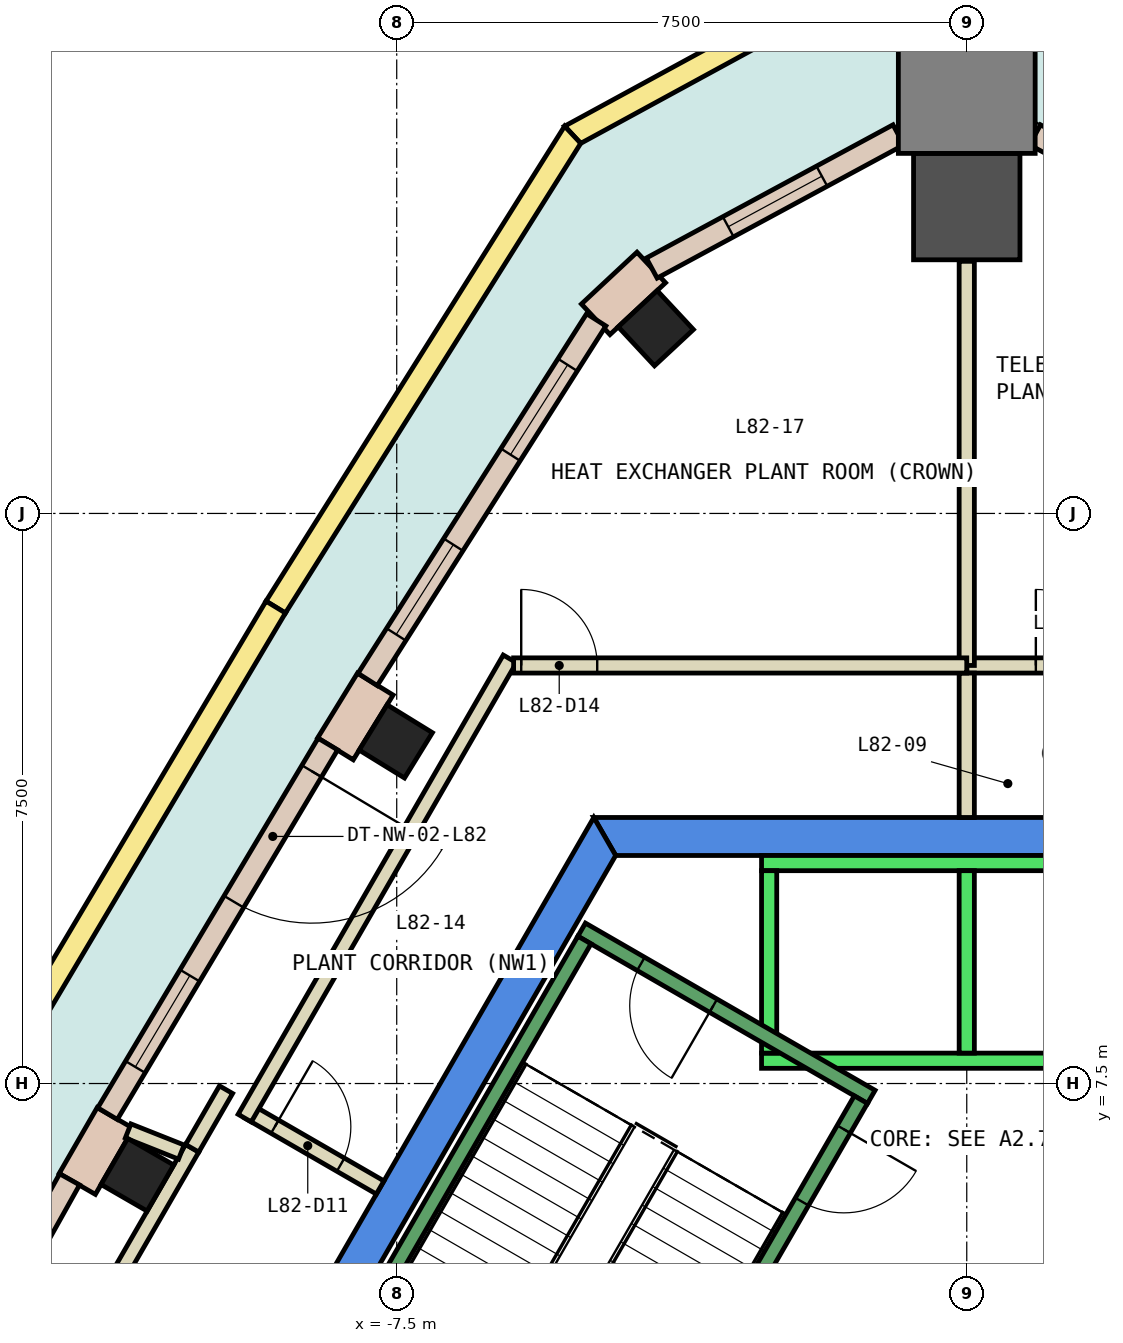
"""IFC4 building model, lengths in metres.
Left out: names, types, materials, properties, quantities, classifications, styles, units other than length and angle.
Written with IfcOpenShell. Run it as: python <this file> out.ifc"""

import sys

from ifc_helpers import new_model, si_unit, direction, frame, frame_2d, origin, origin_2d, place, context, subcontext, project, spatial, polyline, rectangle, outline, extrude, element, fill, save


model = new_model("IFC4")
c1 = context("Model", 3, precision=1e-05, world=origin(), true_north=direction((0.0, 1.0)))
c2 = subcontext(c1, "Body", "Model", "MODEL_VIEW")
j1 = project(units=[si_unit("LENGTHUNIT", "METRE"), si_unit("PLANEANGLEUNIT", "RADIAN")], contexts=[c1])
p1 = place(None, origin())
s1 = spatial("IfcSite", under=j1, at=p1, CompositionType="ELEMENT")
p2 = place(p1, origin())
s2 = spatial("IfcBuilding", under=s1, at=p2, CompositionType="ELEMENT")
p3 = place(p2, frame((0.0, 0.0, 349.4)))
s3 = spatial("IfcBuildingStorey", under=s2, at=p3, CompositionType="ELEMENT", Elevation=349.4)
p4 = place(p3, frame((0.0, 19.037, 0.0), z_axis=(0.0, 0.0, 1.0), x_axis=(0.0, 1.0, 0.0)))
e1 = element("IfcColumn", 1, at=p4, inside=s3, PredefinedType="COLUMN", context=c2, shape_type="SweptSolid", body=[
    extrude(rectangle(XDim=1.4, YDim=1.4, at=origin_2d()), origin(), (0.0, 0.0, 1.0), 4.15),
])
for number, where, z_axis, x_axis in (
    (2, (-4.091, 17.437, 0.0), (0.0, 0.0, 1.0), (0.732, 0.682, 0.0)),
    (3, (-7.512, 12.001, 0.0), (0.0, 0.0, 1.0), (0.524, 0.851, 0.0)),
    (4, (-10.912, 6.3, 0.0), (0.0, 0.0, 1.0), (0.5, 0.866, 0.0)),
):
    element("IfcColumn", number, at=place(p3, frame(where, z_axis=z_axis, x_axis=x_axis)), inside=s3, PredefinedType="COLUMN", context=c2, shape_type="SweptSolid", body=[
        extrude(rectangle(XDim=0.7, YDim=0.7, at=origin_2d()), origin(), (0.0, 0.0, 1.0), 4.15),
    ])
p5 = place(p3, frame((0.0, 20.637, 0.0), z_axis=(0.0, 0.0, 1.0), x_axis=(0.0, 1.0, 0.0)))
e5 = element("IfcColumn", 5, at=p5, inside=s3, PredefinedType="COLUMN", context=c2, shape_type="SweptSolid", body=[
    extrude(rectangle(XDim=1.8, YDim=1.8, at=origin_2d()), origin(), (0.0, 0.0, 1.0), 4.15),
])
p6 = place(p3, frame((0.0, 0.0, -0.45)))
e6 = element("IfcWall", 6, at=p6, inside=s3, PredefinedType="SHEAR", context=c2, shape_type="SweptSolid", body=[
    extrude(outline(polyline([(4.907, 11.0), (-4.907, 11.0), (-4.619, 10.5), (4.619, 10.5), (4.907, 11.0)])), origin(), (0.0, 0.0, 1.0), 4.6),
])
p7 = place(p3, frame((0.0, 0.0, -0.45)))
e7 = element("IfcWall", 7, at=p7, inside=s3, PredefinedType="SHEAR", context=c2, shape_type="SweptSolid", body=[
    extrude(outline(polyline([(-9.236, 3.502), (-8.803, 3.253), (-4.619, 10.5), (-4.907, 11.0), (-9.236, 3.502)])), origin(), (0.0, 0.0, 1.0), 4.6),
])
for number, where, z_axis, x_axis in (
    (8, (-4.151, 18.236, 0.0), (0.0, 0.0, 1.0), (-0.731, -0.682, 0.0)),
    (9, (-7.782, 12.755, 0.0), (0.0, 0.0, 1.0), (-0.524, -0.852, 0.0)),
):
    element("IfcWall", number, at=place(p3, frame(where, z_axis=z_axis, x_axis=x_axis)), inside=s3, PredefinedType="STANDARD", context=c2, shape_type="SweptSolid", body=[
        extrude(rectangle(XDim=1.0, YDim=0.55, at=frame_2d((0.5, 0.0))), origin(), (0.0, 0.0, 1.0), 4.15),
    ])
p8 = place(p3, frame((-11.203, 7.046, 0.0), z_axis=(0.0, 0.0, 1.0), x_axis=(-0.49960277677, -0.866254619292, 0.0)))
e10 = element("IfcWall", 10, at=p8, inside=s3, PredefinedType="STANDARD", context=c2, shape_type="SweptSolid", body=[
    extrude(rectangle(XDim=1.001, YDim=0.55, at=frame_2d((0.5, 0.0))), origin(), (0.0, 0.0, 1.0), 4.15),
])
p9 = place(p3, frame((4.145, 18.228, 0.0), z_axis=(0.0, 0.0, 1.0), x_axis=(-0.879900970731, 0.475157112654, 0.0)))
e11 = element("IfcWall", 11, at=p9, inside=s3, PredefinedType="STANDARD", context=c2, shape_type="SweptSolid", body=[
    extrude(rectangle(XDim=3.689, YDim=0.3, at=frame_2d((1.845, 0.0))), origin(), (0.0, 0.0, 1.0), 4.15),
])
p10 = place(p9, frame((1.145, 0.0, 0.9)))
e12 = element("IfcOpeningElement", 12, at=p10, cuts=e11, PredefinedType="OPENING", context=c2, shape_type="SweptSolid", body=[
    extrude(rectangle(XDim=1.4, YDim=3.0, at=frame_2d((0.7, 1.5))), frame((0.0, 0.16, 0.0), z_axis=(0.0, -1.0, 0.0), x_axis=(1.0, 0.0, 0.0)), (0.0, 0.0, 1.0), 0.32),
])
p11 = place(p3, frame((-0.899, 19.981, 0.0), z_axis=(0.0, 0.0, 1.0), x_axis=(-0.879900970731, -0.475157112654, 0.0)))
e13 = element("IfcWall", 13, at=p11, inside=s3, PredefinedType="STANDARD", context=c2, shape_type="SweptSolid", body=[
    extrude(rectangle(XDim=3.689, YDim=0.3, at=frame_2d((1.845, 0.0))), origin(), (0.0, 0.0, 1.0), 4.15),
])
p12 = place(p11, frame((1.145, 0.0, 0.9)))
e14 = element("IfcOpeningElement", 14, at=p12, cuts=e13, PredefinedType="OPENING", context=c2, shape_type="SweptSolid", body=[
    extrude(rectangle(XDim=1.4, YDim=3.0, at=frame_2d((0.7, 1.5))), frame((0.0, 0.16, 0.0), z_axis=(0.0, -1.0, 0.0), x_axis=(1.0, 0.0, 0.0)), (0.0, 0.0, 1.0), 0.32),
])
p13 = place(p3, frame((-4.875, 17.547, 0.0), z_axis=(0.0, 0.0, 1.0), x_axis=(-0.536531689467, -0.84388017289, 0.0)))
e15 = element("IfcWall", 15, at=p13, inside=s3, PredefinedType="STANDARD", context=c2, shape_type="SweptSolid", body=[
    extrude(rectangle(XDim=5.606, YDim=0.3, at=frame_2d((2.803, 0.0))), origin(), (0.0, 0.0, 1.0), 4.15),
])
p14 = place(p13, frame((0.702, 0.0, 0.9)))
e16 = element("IfcOpeningElement", 16, at=p14, cuts=e15, PredefinedType="OPENING", context=c2, shape_type="SweptSolid", body=[
    extrude(rectangle(XDim=1.4, YDim=3.0, at=frame_2d((0.7, 1.5))), frame((0.0, 0.16, 0.0), z_axis=(0.0, -1.0, 0.0), x_axis=(1.0, 0.0, 0.0)), (0.0, 0.0, 1.0), 0.32),
])
p15 = place(p13, frame((3.505, 0.0, 0.9)))
e17 = element("IfcOpeningElement", 17, at=p15, cuts=e15, PredefinedType="OPENING", context=c2, shape_type="SweptSolid", body=[
    extrude(rectangle(XDim=1.4, YDim=3.0, at=frame_2d((0.7, 1.5))), frame((0.0, 0.16, 0.0), z_axis=(0.0, -1.0, 0.0), x_axis=(1.0, 0.0, 0.0)), (0.0, 0.0, 1.0), 0.32),
])
p16 = place(p3, frame((-8.406, 11.966, 0.0), z_axis=(0.0, 0.0, 1.0), x_axis=(-0.512115331419, -0.858916694055, 0.0)))
e18 = element("IfcWall", 18, at=p16, inside=s3, PredefinedType="STANDARD", context=c2, shape_type="SweptSolid", body=[
    extrude(rectangle(XDim=5.661, YDim=0.3, at=frame_2d((2.83, 0.0))), origin(), (0.0, 0.0, 1.0), 4.15),
])
p17 = place(p16, frame((0.415, 0.0, 0.0)))
e19 = element("IfcOpeningElement", 19, at=p17, cuts=e18, PredefinedType="OPENING", context=c2, shape_type="SweptSolid", body=[
    extrude(rectangle(XDim=2.0, YDim=2.4, at=frame_2d((1.0, 1.2))), frame((0.0, 0.16, 0.0), z_axis=(0.0, -1.0, 0.0), x_axis=(1.0, 0.0, 0.0)), (0.0, 0.0, 1.0), 0.32),
])
p18 = place(p16, frame((3.546, 0.0, 0.9)))
e20 = element("IfcOpeningElement", 20, at=p18, cuts=e18, PredefinedType="OPENING", context=c2, shape_type="SweptSolid", body=[
    extrude(rectangle(XDim=1.4, YDim=3.0, at=frame_2d((0.7, 1.5))), frame((0.0, 0.16, 0.0), z_axis=(0.0, -1.0, 0.0), x_axis=(1.0, 0.0, 0.0)), (0.0, 0.0, 1.0), 0.32),
])
p19 = place(p3, frame((-11.804, 6.239, 0.0), z_axis=(0.0, 0.0, 1.0), x_axis=(-0.487863884296, -0.872919715896, 0.0)))
e21 = element("IfcWall", 21, at=p19, inside=s3, PredefinedType="STANDARD", context=c2, shape_type="SweptSolid", body=[
    extrude(rectangle(XDim=5.661, YDim=0.3, at=frame_2d((2.831, 0.0))), origin(), (0.0, 0.0, 1.0), 4.15),
])
p20 = place(p19, frame((0.715, 0.0, 0.9)))
e22 = element("IfcOpeningElement", 22, at=p20, cuts=e21, PredefinedType="OPENING", context=c2, shape_type="SweptSolid", body=[
    extrude(rectangle(XDim=1.4, YDim=3.0, at=frame_2d((0.7, 1.5))), frame((0.0, 0.16, 0.0), z_axis=(0.0, -1.0, 0.0), x_axis=(1.0, 0.0, 0.0)), (0.0, 0.0, 1.0), 0.32),
])
p21 = place(p19, frame((3.546, 0.0, 0.9)))
e23 = element("IfcOpeningElement", 23, at=p21, cuts=e21, PredefinedType="OPENING", context=c2, shape_type="SweptSolid", body=[
    extrude(rectangle(XDim=1.4, YDim=3.0, at=frame_2d((0.7, 1.5))), frame((0.0, 0.16, 0.0), z_axis=(0.0, -1.0, 0.0), x_axis=(1.0, 0.0, 0.0)), (0.0, 0.0, 1.0), 0.32),
])
p22 = place(p3, origin())
e24 = element("IfcWall", 24, at=p22, inside=s3, PredefinedType="PARAPET", context=c2, shape_type="SweptSolid", body=[
    extrude(outline(polyline([(5.291, 20.095), (0.0, 22.976), (0.0, 22.634), (5.079, 19.869), (5.291, 20.095)])), origin(), (0.0, 0.0, 1.0), 1.1),
])
p23 = place(p3, origin())
e25 = element("IfcWall", 25, at=p23, inside=s3, PredefinedType="PARAPET", context=c2, shape_type="SweptSolid", body=[
    extrude(outline(polyline([(0.0, 22.976), (-5.291, 20.095), (-5.079, 19.869), (0.0, 22.634), (0.0, 22.976)])), origin(), (0.0, 0.0, 1.0), 1.1),
])
p24 = place(p3, origin())
e26 = element("IfcWall", 26, at=p24, inside=s3, PredefinedType="PARAPET", context=c2, shape_type="SweptSolid", body=[
    extrude(outline(polyline([(-5.291, 20.095), (-9.22, 13.846), (-8.964, 13.69), (-5.079, 19.869), (-5.291, 20.095)])), origin(), (0.0, 0.0, 1.0), 1.1),
])
p25 = place(p3, origin())
e27 = element("IfcWall", 27, at=p25, inside=s3, PredefinedType="PARAPET", context=c2, shape_type="SweptSolid", body=[
    extrude(outline(polyline([(-9.22, 13.846), (-12.99, 7.5), (-12.73, 7.35), (-8.964, 13.69), (-9.22, 13.846)])), origin(), (0.0, 0.0, 1.0), 1.1),
])
p26 = place(p3, frame((0.0, 13.0, 0.0), z_axis=(0.0, 0.0, 1.0), x_axis=(1.0, 0.0, 0.0)))
e28 = element("IfcWall", 28, at=p26, inside=s3, PredefinedType="PARTITIONING", context=c2, shape_type="SweptSolid", body=[
    extrude(rectangle(XDim=2.838, YDim=0.2, at=frame_2d((1.419, 0.0))), origin(), (0.0, 0.0, 1.0), 4.15),
])
p27 = place(p26, frame((0.909, 0.0, 0.0)))
e29 = element("IfcOpeningElement", 29, at=p27, cuts=e28, PredefinedType="OPENING", context=c2, shape_type="SweptSolid", body=[
    extrude(rectangle(XDim=1.0, YDim=2.1, at=frame_2d((0.5, 1.05))), frame((0.0, 0.11, 0.0), z_axis=(0.0, -1.0, 0.0), x_axis=(1.0, 0.0, 0.0)), (0.0, 0.0, 1.0), 0.22),
])
p28 = place(p3, frame((0.0, 11.0, 0.0), z_axis=(0.0, 0.0, 1.0), x_axis=(0.0, 1.0, 0.0)))
e30 = element("IfcWall", 30, at=p28, inside=s3, PredefinedType="PARTITIONING", context=c2, shape_type="SweptSolid", body=[
    extrude(rectangle(XDim=1.9, YDim=0.2, at=frame_2d((0.95, 0.0))), origin(), (0.0, 0.0, 1.0), 4.15),
])
p29 = place(p3, frame((0.0, 13.0, 0.0), z_axis=(0.0, 0.0, 1.0), x_axis=(0.0, 1.0, 0.0)))
e31 = element("IfcWall", 31, at=p29, inside=s3, PredefinedType="PARTITIONING", context=c2, shape_type="SweptSolid", body=[
    extrude(rectangle(XDim=5.317, YDim=0.2, at=frame_2d((2.658, 0.0))), origin(), (0.0, 0.0, 1.0), 4.15),
])
p30 = place(p3, frame((-9.45, 7.132, 0.0), z_axis=(0.0, 0.0, 1.0), x_axis=(0.866010750942, -0.50002537861, 0.0)))
e32 = element("IfcWall", 32, at=p30, inside=s3, PredefinedType="PARTITIONING", context=c2, shape_type="SweptSolid", body=[
    extrude(rectangle(XDim=2.0, YDim=0.2, at=frame_2d((1.0, 0.0))), origin(), (0.0, 0.0, 1.0), 4.15),
])
p31 = place(p30, frame((0.4, 0.0, 0.0)))
e33 = element("IfcOpeningElement", 33, at=p31, cuts=e32, PredefinedType="OPENING", context=c2, shape_type="SweptSolid", body=[
    extrude(rectangle(XDim=1.0, YDim=2.1, at=frame_2d((0.5, 1.05))), frame((0.0, 0.11, 0.0), z_axis=(0.0, -1.0, 0.0), x_axis=(1.0, 0.0, 0.0)), (0.0, 0.0, 1.0), 0.22),
])
p32 = place(p3, frame((-13.346, 1.183, 0.0), z_axis=(0.0, 0.0, 1.0), x_axis=(0.49998814853, 0.866032246126, 0.0)))
e34 = element("IfcWall", 34, at=p32, inside=s3, PredefinedType="PARTITIONING", context=c2, shape_type="SweptSolid", body=[
    extrude(rectangle(XDim=6.31, YDim=0.2, at=frame_2d((3.155, 0.0))), origin(), (0.0, 0.0, 1.0), 4.15),
])
p33 = place(p32, frame((1.18, 0.0, 0.0)))
e35 = element("IfcOpeningElement", 35, at=p33, cuts=e34, PredefinedType="OPENING", context=c2, shape_type="SweptSolid", body=[
    extrude(rectangle(XDim=1.0, YDim=2.1, at=frame_2d((0.5, 1.05))), frame((0.0, 0.11, 0.0), z_axis=(0.0, -1.0, 0.0), x_axis=(1.0, 0.0, 0.0)), (0.0, 0.0, 1.0), 0.22),
])
p34 = place(p3, frame((-10.191, 6.648, 0.0), z_axis=(0.0, 0.0, 1.0), x_axis=(0.49973828311, 0.866176453382, 0.0)))
e36 = element("IfcWall", 36, at=p34, inside=s3, PredefinedType="PARTITIONING", context=c2, shape_type="SweptSolid", body=[
    extrude(rectangle(XDim=0.89, YDim=0.2, at=frame_2d((0.445, 0.0))), origin(), (0.0, 0.0, 1.0), 4.15),
])
p35 = place(p3, frame((-9.5, 7.045, 0.0), z_axis=(0.0, 0.0, 1.0), x_axis=(0.499966812698, 0.866044563634, 0.0)))
e37 = element("IfcWall", 37, at=p35, inside=s3, PredefinedType="PARTITIONING", context=c2, shape_type="SweptSolid", body=[
    extrude(rectangle(XDim=6.977, YDim=0.2, at=frame_2d((3.488, 0.0))), origin(), (0.0, 0.0, 1.0), 4.15),
])
p36 = place(p3, frame((-5.962, 13.0, 0.0), z_axis=(0.0, 0.0, 1.0), x_axis=(1.0, 0.0, 0.0)))
e38 = element("IfcWall", 38, at=p36, inside=s3, PredefinedType="PARTITIONING", context=c2, shape_type="SweptSolid", body=[
    extrude(rectangle(XDim=5.962, YDim=0.2, at=frame_2d((2.981, 0.0))), origin(), (0.0, 0.0, 1.0), 4.15),
])
p37 = place(p36, frame((0.1, 0.0, 0.0)))
e39 = element("IfcOpeningElement", 39, at=p37, cuts=e38, PredefinedType="OPENING", context=c2, shape_type="SweptSolid", body=[
    extrude(rectangle(XDim=1.0, YDim=2.1, at=frame_2d((0.5, 1.05))), frame((0.0, 0.11, 0.0), z_axis=(0.0, -1.0, 0.0), x_axis=(1.0, 0.0, 0.0)), (0.0, 0.0, 1.0), 0.22),
])
p38 = place(p3, frame((-11.034, 6.876, 0.0), z_axis=(0.0, 0.0, 1.0), x_axis=(0.929345991637, -0.369210005049, 0.0)))
e40 = element("IfcWall", 40, at=p38, inside=s3, PredefinedType="PARTITIONING", context=c2, shape_type="SweptSolid", body=[
    extrude(rectangle(XDim=0.753, YDim=0.2, at=frame_2d((0.376, 0.0))), origin(), (0.0, 0.0, 1.0), 4.15),
])
for number, where, z_axis, x_axis in (
    (41, (2.7, 7.8, 0.0), (0.0, 0.0, 1.0), (-1.0, 0.0, 0.0)),
    (42, (2.7, 10.4, 0.0), (0.0, 0.0, 1.0), (-1.0, 0.0, 0.0)),
):
    element("IfcWall", number, at=place(p3, frame(where, z_axis=z_axis, x_axis=x_axis)), inside=s3, PredefinedType="STANDARD", context=c2, shape_type="SweptSolid", body=[
        extrude(rectangle(XDim=5.4, YDim=0.2, at=frame_2d((2.7, 0.0))), origin(), (0.0, 0.0, 1.0), 4.15),
    ])
for number, where, z_axis, x_axis in (
    (43, (0.0, 7.9, 0.0), (0.0, 0.0, 1.0), (0.0, 1.0, 0.0)),
    (44, (-2.6, 7.9, 0.0), (0.0, 0.0, 1.0), (0.0, 1.0, 0.0)),
):
    element("IfcWall", number, at=place(p3, frame(where, z_axis=z_axis, x_axis=x_axis)), inside=s3, PredefinedType="STANDARD", context=c2, shape_type="SweptSolid", body=[
        extrude(rectangle(XDim=2.4, YDim=0.2, at=frame_2d((1.2, 0.0))), origin(), (0.0, 0.0, 1.0), 4.15),
    ])
p39 = place(p3, frame((-1.256, 7.324, 0.0), z_axis=(0.0, 0.0, 1.0), x_axis=(-0.866046073146, 0.499964197906, 0.0)))
e45 = element("IfcWall", 45, at=p39, inside=s3, PredefinedType="STANDARD", context=c2, shape_type="SweptSolid", body=[
    extrude(rectangle(XDim=4.4, YDim=0.2, at=frame_2d((2.2, 0.0))), origin(), (0.0, 0.0, 1.0), 4.15),
])
p40 = place(p39, frame((2.4, 0.0, 0.0)))
e46 = element("IfcOpeningElement", 46, at=p40, cuts=e45, PredefinedType="OPENING", context=c2, shape_type="SweptSolid", body=[
    extrude(rectangle(XDim=1.1, YDim=2.2, at=frame_2d((0.55, 1.1))), frame((0.0, 0.11, 0.0), z_axis=(0.0, -1.0, 0.0), x_axis=(1.0, 0.0, 0.0)), (0.0, 0.0, 1.0), 0.22),
])
p41 = place(p3, frame((-1.393, 7.288, 0.0), z_axis=(0.0, 0.0, 1.0), x_axis=(-0.499963383562, -0.866046543262, 0.0)))
e47 = element("IfcWall", 47, at=p41, inside=s3, PredefinedType="STANDARD", context=c2, shape_type="SweptSolid", body=[
    extrude(rectangle(XDim=6.9, YDim=0.2, at=frame_2d((3.45, 0.0))), origin(), (0.0, 0.0, 1.0), 4.15),
])
p42 = place(p41, frame((0.45, 0.0, 0.0)))
e48 = element("IfcOpeningElement", 48, at=p42, cuts=e47, PredefinedType="OPENING", context=c2, shape_type="SweptSolid", body=[
    extrude(rectangle(XDim=1.1, YDim=2.2, at=frame_2d((0.55, 1.1))), frame((0.0, 0.11, 0.0), z_axis=(0.0, -1.0, 0.0), x_axis=(1.0, 0.0, 0.0)), (0.0, 0.0, 1.0), 0.22),
])
p43 = place(p3, frame((-5.03, 9.388, 0.0), z_axis=(0.0, 0.0, 1.0), x_axis=(-0.499978703459, -0.866037698999, 0.0)))
e49 = element("IfcWall", 49, at=p43, inside=s3, PredefinedType="STANDARD", context=c2, shape_type="SweptSolid", body=[
    extrude(rectangle(XDim=6.9, YDim=0.2, at=frame_2d((3.45, 0.0))), origin(), (0.0, 0.0, 1.0), 4.15),
])
p44 = place(p12, origin())
e50 = element("IfcWindow", 50, at=p44, inside=s3, PartitioningType="SINGLE_PANEL", PredefinedType="WINDOW", context=c2, shape_type="SweptSolid", body=[
    extrude(rectangle(XDim=1.4, YDim=3.0, at=frame_2d((0.7, 1.5))), frame((0.0, 0.03, 0.0), z_axis=(0.0, -1.0, 0.0), x_axis=(1.0, 0.0, 0.0)), (0.0, 0.0, 1.0), 0.06),
])
fill(e14, e50)
p45 = place(p14, origin())
e51 = element("IfcWindow", 51, at=p45, inside=s3, PartitioningType="SINGLE_PANEL", PredefinedType="WINDOW", context=c2, shape_type="SweptSolid", body=[
    extrude(rectangle(XDim=1.4, YDim=3.0, at=frame_2d((0.7, 1.5))), frame((0.0, 0.03, 0.0), z_axis=(0.0, -1.0, 0.0), x_axis=(1.0, 0.0, 0.0)), (0.0, 0.0, 1.0), 0.06),
])
fill(e16, e51)
p46 = place(p15, origin())
e52 = element("IfcWindow", 52, at=p46, inside=s3, PartitioningType="SINGLE_PANEL", PredefinedType="WINDOW", context=c2, shape_type="SweptSolid", body=[
    extrude(rectangle(XDim=1.4, YDim=3.0, at=frame_2d((0.7, 1.5))), frame((0.0, 0.03, 0.0), z_axis=(0.0, -1.0, 0.0), x_axis=(1.0, 0.0, 0.0)), (0.0, 0.0, 1.0), 0.06),
])
fill(e17, e52)
p47 = place(p17, origin())
e53 = element("IfcDoor", 53, at=p47, inside=s3, OperationType="SLIDING_TO_LEFT", PredefinedType="DOOR", context=c2, shape_type="SweptSolid", body=[
    extrude(rectangle(XDim=2.0, YDim=2.4, at=frame_2d((1.0, 1.2))), frame((0.0, 0.025, 0.0), z_axis=(0.0, -1.0, 0.0), x_axis=(1.0, 0.0, 0.0)), (0.0, 0.0, 1.0), 0.05),
])
fill(e19, e53)
p48 = place(p18, origin())
e54 = element("IfcWindow", 54, at=p48, inside=s3, PartitioningType="SINGLE_PANEL", PredefinedType="WINDOW", context=c2, shape_type="SweptSolid", body=[
    extrude(rectangle(XDim=1.4, YDim=3.0, at=frame_2d((0.7, 1.5))), frame((0.0, 0.03, 0.0), z_axis=(0.0, -1.0, 0.0), x_axis=(1.0, 0.0, 0.0)), (0.0, 0.0, 1.0), 0.06),
])
fill(e20, e54)
p49 = place(p27, origin())
e55 = element("IfcDoor", 55, at=p49, inside=s3, OperationType="SINGLE_SWING_LEFT", PredefinedType="DOOR", context=c2, shape_type="SweptSolid", body=[
    extrude(rectangle(XDim=1.0, YDim=2.1, at=frame_2d((0.5, 1.05))), frame((0.0, 0.025, 0.0), z_axis=(0.0, -1.0, 0.0), x_axis=(1.0, 0.0, 0.0)), (0.0, 0.0, 1.0), 0.05),
])
fill(e29, e55)
p50 = place(p31, origin())
e56 = element("IfcDoor", 56, at=p50, inside=s3, OperationType="SINGLE_SWING_LEFT", PredefinedType="DOOR", context=c2, shape_type="SweptSolid", body=[
    extrude(rectangle(XDim=1.0, YDim=2.1, at=frame_2d((0.5, 1.05))), frame((0.0, 0.025, 0.0), z_axis=(0.0, -1.0, 0.0), x_axis=(1.0, 0.0, 0.0)), (0.0, 0.0, 1.0), 0.05),
])
fill(e33, e56)
p51 = place(p37, origin())
e57 = element("IfcDoor", 57, at=p51, inside=s3, OperationType="SINGLE_SWING_RIGHT", PredefinedType="DOOR", context=c2, shape_type="SweptSolid", body=[
    extrude(rectangle(XDim=1.0, YDim=2.1, at=frame_2d((0.5, 1.05))), frame((0.0, 0.025, 0.0), z_axis=(0.0, -1.0, 0.0), x_axis=(1.0, 0.0, 0.0)), (0.0, 0.0, 1.0), 0.05),
])
fill(e39, e57)
p52 = place(p42, origin())
e58 = element("IfcDoor", 58, at=p52, inside=s3, OperationType="SINGLE_SWING_LEFT", PredefinedType="DOOR", context=c2, shape_type="SweptSolid", body=[
    extrude(rectangle(XDim=1.1, YDim=2.2, at=frame_2d((0.55, 1.1))), frame((0.0, 0.025, 0.0), z_axis=(0.0, -1.0, 0.0), x_axis=(1.0, 0.0, 0.0)), (0.0, 0.0, 1.0), 0.05),
])
fill(e48, e58)
p53 = place(p40, origin())
e59 = element("IfcDoor", 59, at=p53, inside=s3, OperationType="SINGLE_SWING_LEFT", PredefinedType="DOOR", context=c2, shape_type="SweptSolid", body=[
    extrude(rectangle(XDim=1.1, YDim=2.2, at=frame_2d((0.55, 1.1))), frame((0.0, 0.025, 0.0), z_axis=(0.0, -1.0, 0.0), x_axis=(1.0, 0.0, 0.0)), (0.0, 0.0, 1.0), 0.05),
])
fill(e46, e59)
save(model, sys.argv[1])
